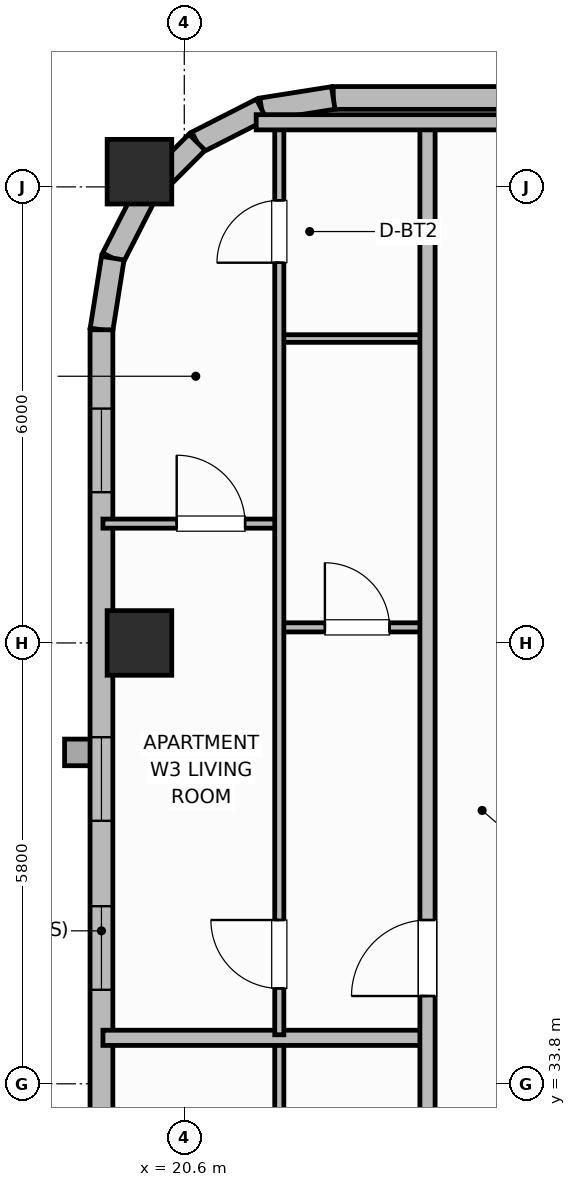
"""IFC4 building model, lengths in metres.
Left out: names, types, materials, properties, quantities, classifications, styles, units other than length and angle.
Written with IfcOpenShell. Run it as: python <this file> out.ifc"""

import sys

from ifc_helpers import new_model, si_unit, direction, frame, frame_2d, origin, origin_2d, place, context, subcontext, project, spatial, rectangle, extrude, element, fill, save


model = new_model("IFC4")
c1 = context("Model", 3, precision=1e-05, world=origin(), true_north=direction((0.0, 1.0)))
c2 = subcontext(c1, "Body", "Model", "MODEL_VIEW")
j1 = project(units=[si_unit("LENGTHUNIT", "METRE"), si_unit("PLANEANGLEUNIT", "RADIAN")], contexts=[c1])
p1 = place(None, origin())
s1 = spatial("IfcSite", under=j1, at=p1, CompositionType="ELEMENT")
p2 = place(p1, origin())
s2 = spatial("IfcBuilding", under=s1, at=p2, CompositionType="ELEMENT")
p3 = place(p2, frame((0.0, 0.0, 236.9)))
s3 = spatial("IfcBuildingStorey", under=s2, at=p3, CompositionType="ELEMENT", Elevation=236.9)
for number, where, z_axis, x_axis in (
    (1, (20.01, 39.6, 0.0), (0.0, 0.0, 1.0), (1.0, 0.0, 0.0)),
    (2, (20.01, 45.8, 0.0), (0.0, 0.0, 1.0), (1.0, 0.0, 0.0)),
):
    element("IfcColumn", number, at=place(p3, frame(where, z_axis=z_axis, x_axis=x_axis)), inside=s3, PredefinedType="COLUMN", context=c2, shape_type="SweptSolid", body=[
        extrude(rectangle(XDim=0.85, YDim=0.85, at=origin_2d()), origin(), (0.0, 0.0, 1.0), 3.7),
    ])
p4 = place(p3, frame((47.79, 46.77, 0.0), z_axis=(0.0, 0.0, 1.0), x_axis=(-1.0, 0.0, 0.0)))
e3 = element("IfcWall", 3, at=p4, inside=s3, PredefinedType="SOLIDWALL", context=c2, shape_type="SweptSolid", body=[
    extrude(rectangle(XDim=25.23, YDim=0.3, at=frame_2d((12.615, 0.0))), origin(), (0.0, 0.0, 1.0), 2.73),
])
p5 = place(p4, frame((1.659, 0.0, 0.76)))
e4 = element("IfcOpeningElement", 4, at=p5, cuts=e3, PredefinedType="OPENING", context=c2, shape_type="SweptSolid", body=[
    extrude(rectangle(XDim=1.4, YDim=1.85, at=frame_2d((0.7, 0.925))), frame((0.0, 0.16, 0.0), z_axis=(0.0, -1.0, 0.0), x_axis=(1.0, 0.0, 0.0)), (0.0, 0.0, 1.0), 0.32),
])
p6 = place(p4, frame((5.778, 0.0, 0.76)))
e5 = element("IfcOpeningElement", 5, at=p6, cuts=e3, PredefinedType="OPENING", context=c2, shape_type="SweptSolid", body=[
    extrude(rectangle(XDim=1.4, YDim=1.85, at=frame_2d((0.7, 0.925))), frame((0.0, 0.16, 0.0), z_axis=(0.0, -1.0, 0.0), x_axis=(1.0, 0.0, 0.0)), (0.0, 0.0, 1.0), 0.32),
])
p7 = place(p4, frame((8.496, 0.0, 0.76)))
e6 = element("IfcOpeningElement", 6, at=p7, cuts=e3, PredefinedType="OPENING", context=c2, shape_type="SweptSolid", body=[
    extrude(rectangle(XDim=1.4, YDim=1.85, at=frame_2d((0.7, 0.925))), frame((0.0, 0.16, 0.0), z_axis=(0.0, -1.0, 0.0), x_axis=(1.0, 0.0, 0.0)), (0.0, 0.0, 1.0), 0.32),
])
p8 = place(p4, frame((15.333, 0.0, 0.76)))
e7 = element("IfcOpeningElement", 7, at=p8, cuts=e3, PredefinedType="OPENING", context=c2, shape_type="SweptSolid", body=[
    extrude(rectangle(XDim=1.4, YDim=1.85, at=frame_2d((0.7, 0.925))), frame((0.0, 0.16, 0.0), z_axis=(0.0, -1.0, 0.0), x_axis=(1.0, 0.0, 0.0)), (0.0, 0.0, 1.0), 0.32),
])
p9 = place(p4, frame((18.752, 0.0, 0.76)))
e8 = element("IfcOpeningElement", 8, at=p9, cuts=e3, PredefinedType="OPENING", context=c2, shape_type="SweptSolid", body=[
    extrude(rectangle(XDim=1.4, YDim=1.85, at=frame_2d((0.7, 0.925))), frame((0.0, 0.16, 0.0), z_axis=(0.0, -1.0, 0.0), x_axis=(1.0, 0.0, 0.0)), (0.0, 0.0, 1.0), 0.32),
])
p10 = place(p3, frame((22.56, 46.77, 0.0), z_axis=(0.0, 0.0, 1.0), x_axis=(-0.987669453596, -0.156553666304, 0.0)))
e9 = element("IfcWall", 9, at=p10, inside=s3, PredefinedType="SOLIDWALL", context=c2, shape_type="SweptSolid", body=[
    extrude(rectangle(XDim=0.954, YDim=0.3, at=frame_2d((0.477, 0.0))), origin(), (0.0, 0.0, 1.0), 2.73),
])
p11 = place(p3, frame((21.617, 46.621, 0.0), z_axis=(0.0, 0.0, 1.0), x_axis=(-0.891023873617, -0.45395644796, 0.0)))
e10 = element("IfcWall", 10, at=p11, inside=s3, PredefinedType="SOLIDWALL", context=c2, shape_type="SweptSolid", body=[
    extrude(rectangle(XDim=0.954, YDim=0.3, at=frame_2d((0.477, 0.0))), origin(), (0.0, 0.0, 1.0), 2.73),
])
p12 = place(p3, frame((20.767, 46.188, 0.0), z_axis=(0.0, 0.0, 1.0), x_axis=(-0.707106781187, -0.707106781187, 0.0)))
e11 = element("IfcWall", 11, at=p12, inside=s3, PredefinedType="SOLIDWALL", context=c2, shape_type="SweptSolid", body=[
    extrude(rectangle(XDim=0.954, YDim=0.3, at=frame_2d((0.477, 0.0))), origin(), (0.0, 0.0, 1.0), 2.73),
])
p13 = place(p3, frame((20.093, 45.513, 0.0), z_axis=(0.0, 0.0, 1.0), x_axis=(-0.454159573051, -0.890920356825, 0.0)))
e12 = element("IfcWall", 12, at=p13, inside=s3, PredefinedType="SOLIDWALL", context=c2, shape_type="SweptSolid", body=[
    extrude(rectangle(XDim=0.954, YDim=0.3, at=frame_2d((0.477, 0.0))), origin(), (0.0, 0.0, 1.0), 2.73),
])
p14 = place(p3, frame((19.659, 44.663, 0.0), z_axis=(0.0, 0.0, 1.0), x_axis=(-0.156304114255, -0.987708977314, 0.0)))
e13 = element("IfcWall", 13, at=p14, inside=s3, PredefinedType="SOLIDWALL", context=c2, shape_type="SweptSolid", body=[
    extrude(rectangle(XDim=0.954, YDim=0.3, at=frame_2d((0.477, 0.0))), origin(), (0.0, 0.0, 1.0), 2.73),
])
p15 = place(p3, frame((19.51, 43.72, 0.0), z_axis=(0.0, 0.0, 1.0), x_axis=(0.0, -1.0, 0.0)))
e14 = element("IfcWall", 14, at=p15, inside=s3, PredefinedType="SOLIDWALL", context=c2, shape_type="SweptSolid", body=[
    extrude(rectangle(XDim=11.12, YDim=0.3, at=frame_2d((5.56, 0.0))), origin(), (0.0, 0.0, 1.0), 2.73),
])
p16 = place(p15, frame((1.037, 0.0, 0.95)))
e15 = element("IfcOpeningElement", 15, at=p16, cuts=e14, PredefinedType="OPENING", context=c2, shape_type="SweptSolid", body=[
    extrude(rectangle(XDim=1.1, YDim=1.65, at=frame_2d((0.55, 0.825))), frame((0.0, 0.16, 0.0), z_axis=(0.0, -1.0, 0.0), x_axis=(1.0, 0.0, 0.0)), (0.0, 0.0, 1.0), 0.32),
])
p17 = place(p15, frame((5.36, 0.0, 0.95)))
e16 = element("IfcOpeningElement", 16, at=p17, cuts=e14, PredefinedType="OPENING", context=c2, shape_type="SweptSolid", body=[
    extrude(rectangle(XDim=1.1, YDim=1.65, at=frame_2d((0.55, 0.825))), frame((0.0, 0.16, 0.0), z_axis=(0.0, -1.0, 0.0), x_axis=(1.0, 0.0, 0.0)), (0.0, 0.0, 1.0), 0.32),
])
p18 = place(p15, frame((7.583, 0.0, 0.95)))
e17 = element("IfcOpeningElement", 17, at=p18, cuts=e14, PredefinedType="OPENING", context=c2, shape_type="SweptSolid", body=[
    extrude(rectangle(XDim=1.1, YDim=1.65, at=frame_2d((0.55, 0.825))), frame((0.0, 0.16, 0.0), z_axis=(0.0, -1.0, 0.0), x_axis=(1.0, 0.0, 0.0)), (0.0, 0.0, 1.0), 0.32),
])
p19 = place(p3, frame((21.85, 22.74, 0.0), z_axis=(0.0, 0.0, 1.0), x_axis=(0.0, 1.0, 0.0)))
e18 = element("IfcWall", 18, at=p19, inside=s3, PredefinedType="PARTITIONING", context=c2, shape_type="SweptSolid", body=[
    extrude(rectangle(XDim=11.625, YDim=0.12, at=frame_2d((5.812, 0.0))), origin(), (0.0, 0.0, 1.0), 2.56),
])
p20 = place(p19, frame((0.61, 0.0, 0.0)))
e19 = element("IfcOpeningElement", 19, at=p20, cuts=e18, PredefinedType="OPENING", context=c2, shape_type="SweptSolid", body=[
    extrude(rectangle(XDim=0.9, YDim=2.1, at=frame_2d((0.45, 1.05))), frame((0.0, 0.07, 0.0), z_axis=(0.0, -1.0, 0.0), x_axis=(1.0, 0.0, 0.0)), (0.0, 0.0, 1.0), 0.14),
])
p21 = place(p3, frame((19.53, 34.405, 0.0), z_axis=(0.0, 0.0, 1.0), x_axis=(1.0, 0.0, 0.0)))
e20 = element("IfcWall", 20, at=p21, inside=s3, PredefinedType="PARTITIONING", context=c2, shape_type="SweptSolid", body=[
    extrude(rectangle(XDim=4.27, YDim=0.2, at=frame_2d((2.135, 0.0))), origin(), (0.0, 0.0, 1.0), 2.56),
])
p22 = place(p3, frame((21.85, 39.805, 0.0), z_axis=(0.0, 0.0, 1.0), x_axis=(1.0, 0.0, 0.0)))
e21 = element("IfcWall", 21, at=p22, inside=s3, PredefinedType="PARTITIONING", context=c2, shape_type="SweptSolid", body=[
    extrude(rectangle(XDim=1.95, YDim=0.12, at=frame_2d((0.975, 0.0))), origin(), (0.0, 0.0, 1.0), 2.56),
])
p23 = place(p22, frame((0.6, 0.0, 0.0)))
e22 = element("IfcOpeningElement", 22, at=p23, cuts=e21, PredefinedType="OPENING", context=c2, shape_type="SweptSolid", body=[
    extrude(rectangle(XDim=0.85, YDim=2.1, at=frame_2d((0.425, 1.05))), frame((0.0, 0.07, 0.0), z_axis=(0.0, -1.0, 0.0), x_axis=(1.0, 0.0, 0.0)), (0.0, 0.0, 1.0), 0.14),
])
p24 = place(p3, frame((21.85, 43.605, 0.0), z_axis=(0.0, 0.0, 1.0), x_axis=(1.0, 0.0, 0.0)))
e23 = element("IfcWall", 23, at=p24, inside=s3, PredefinedType="PARTITIONING", context=c2, shape_type="SweptSolid", body=[
    extrude(rectangle(XDim=1.95, YDim=0.1, at=frame_2d((0.975, 0.0))), origin(), (0.0, 0.0, 1.0), 2.56),
])
p25 = place(p3, frame((19.53, 41.17, 0.0), z_axis=(0.0, 0.0, 1.0), x_axis=(1.0, 0.0, 0.0)))
e24 = element("IfcWall", 24, at=p25, inside=s3, PredefinedType="PARTITIONING", context=c2, shape_type="SweptSolid", body=[
    extrude(rectangle(XDim=2.32, YDim=0.12, at=frame_2d((1.16, 0.0))), origin(), (0.0, 0.0, 1.0), 2.56),
])
p26 = place(p25, frame((0.97, 0.0, 0.0)))
e25 = element("IfcOpeningElement", 25, at=p26, cuts=e24, PredefinedType="OPENING", context=c2, shape_type="SweptSolid", body=[
    extrude(rectangle(XDim=0.9, YDim=2.1, at=frame_2d((0.45, 1.05))), frame((0.0, 0.07, 0.0), z_axis=(0.0, -1.0, 0.0), x_axis=(1.0, 0.0, 0.0)), (0.0, 0.0, 1.0), 0.14),
])
p27 = place(p3, frame((21.85, 34.445, 0.0), z_axis=(0.0, 0.0, 1.0), x_axis=(0.0, 1.0, 0.0)))
e26 = element("IfcWall", 26, at=p27, inside=s3, PredefinedType="PARTITIONING", context=c2, shape_type="SweptSolid", body=[
    extrude(rectangle(XDim=11.965, YDim=0.12, at=frame_2d((5.982, 0.0))), origin(), (0.0, 0.0, 1.0), 2.56),
])
p28 = place(p27, frame((0.61, 0.0, 0.0)))
e27 = element("IfcOpeningElement", 27, at=p28, cuts=e26, PredefinedType="OPENING", context=c2, shape_type="SweptSolid", body=[
    extrude(rectangle(XDim=0.9, YDim=2.1, at=frame_2d((0.45, 1.05))), frame((0.0, 0.07, 0.0), z_axis=(0.0, -1.0, 0.0), x_axis=(1.0, 0.0, 0.0)), (0.0, 0.0, 1.0), 0.14),
])
p29 = place(p27, frame((10.157, 0.0, 0.0)))
e28 = element("IfcOpeningElement", 28, at=p29, cuts=e26, PredefinedType="OPENING", context=c2, shape_type="SweptSolid", body=[
    extrude(rectangle(XDim=0.82, YDim=2.08, at=frame_2d((0.41, 1.04))), frame((0.0, 0.07, 0.0), z_axis=(0.0, -1.0, 0.0), x_axis=(1.0, 0.0, 0.0)), (0.0, 0.0, 1.0), 0.14),
])
p30 = place(p3, frame((23.8, 9.95, 0.0), z_axis=(0.0, 0.0, 1.0), x_axis=(0.0, 1.0, 0.0)))
e29 = element("IfcWall", 29, at=p30, inside=s3, PredefinedType="PARTITIONING", context=c2, shape_type="SweptSolid", body=[
    extrude(rectangle(XDim=36.5, YDim=0.2, at=frame_2d((18.25, 0.0))), origin(), (0.0, 0.0, 1.0), 2.56),
])
p31 = place(p30, frame((3.25, 0.0, 0.0)))
e30 = element("IfcOpeningElement", 30, at=p31, cuts=e29, PredefinedType="OPENING", context=c2, shape_type="SweptSolid", body=[
    extrude(rectangle(XDim=1.0, YDim=2.15, at=frame_2d((0.5, 1.075))), frame((0.0, 0.11, 0.0), z_axis=(0.0, -1.0, 0.0), x_axis=(1.0, 0.0, 0.0)), (0.0, 0.0, 1.0), 0.22),
])
p32 = place(p30, frame((13.3, 0.0, 0.0)))
e31 = element("IfcOpeningElement", 31, at=p32, cuts=e29, PredefinedType="OPENING", context=c2, shape_type="SweptSolid", body=[
    extrude(rectangle(XDim=1.0, YDim=2.15, at=frame_2d((0.5, 1.075))), frame((0.0, 0.11, 0.0), z_axis=(0.0, -1.0, 0.0), x_axis=(1.0, 0.0, 0.0)), (0.0, 0.0, 1.0), 0.22),
])
p33 = place(p30, frame((25.005, 0.0, 0.0)))
e32 = element("IfcOpeningElement", 32, at=p33, cuts=e29, PredefinedType="OPENING", context=c2, shape_type="SweptSolid", body=[
    extrude(rectangle(XDim=1.0, YDim=2.15, at=frame_2d((0.5, 1.075))), frame((0.0, 0.11, 0.0), z_axis=(0.0, -1.0, 0.0), x_axis=(1.0, 0.0, 0.0)), (0.0, 0.0, 1.0), 0.22),
])
p34 = place(p3, frame((21.546, 46.45, 0.0), z_axis=(0.0, 0.0, 1.0), x_axis=(1.0, 0.0, 0.0)))
e33 = element("IfcWall", 33, at=p34, inside=s3, PredefinedType="PARTITIONING", context=c2, shape_type="SweptSolid", body=[
    extrude(rectangle(XDim=3.754, YDim=0.2, at=frame_2d((1.877, 0.0))), origin(), (0.0, 0.0, 1.0), 2.56),
])
p35 = place(p16, origin())
e34 = element("IfcWindow", 34, at=p35, inside=s3, PartitioningType="SINGLE_PANEL", PredefinedType="WINDOW", context=c2, shape_type="SweptSolid", body=[
    extrude(rectangle(XDim=1.1, YDim=1.65, at=frame_2d((0.55, 0.825))), frame((0.0, 0.03, 0.0), z_axis=(0.0, -1.0, 0.0), x_axis=(1.0, 0.0, 0.0)), (0.0, 0.0, 1.0), 0.06),
])
fill(e15, e34)
p36 = place(p17, origin())
e35 = element("IfcWindow", 35, at=p36, inside=s3, PartitioningType="SINGLE_PANEL", PredefinedType="WINDOW", context=c2, shape_type="SweptSolid", body=[
    extrude(rectangle(XDim=1.1, YDim=1.65, at=frame_2d((0.55, 0.825))), frame((0.0, 0.03, 0.0), z_axis=(0.0, -1.0, 0.0), x_axis=(1.0, 0.0, 0.0)), (0.0, 0.0, 1.0), 0.06),
])
fill(e16, e35)
p37 = place(p18, origin())
e36 = element("IfcWindow", 36, at=p37, inside=s3, PartitioningType="SINGLE_PANEL", PredefinedType="WINDOW", context=c2, shape_type="SweptSolid", body=[
    extrude(rectangle(XDim=1.1, YDim=1.65, at=frame_2d((0.55, 0.825))), frame((0.0, 0.03, 0.0), z_axis=(0.0, -1.0, 0.0), x_axis=(1.0, 0.0, 0.0)), (0.0, 0.0, 1.0), 0.06),
])
fill(e17, e36)
p38 = place(p23, origin())
e37 = element("IfcDoor", 37, at=p38, inside=s3, OperationType="SINGLE_SWING_LEFT", PredefinedType="DOOR", context=c2, shape_type="SweptSolid", body=[
    extrude(rectangle(XDim=0.85, YDim=2.1, at=frame_2d((0.425, 1.05))), frame((0.0, 0.025, 0.0), z_axis=(0.0, -1.0, 0.0), x_axis=(1.0, 0.0, 0.0)), (0.0, 0.0, 1.0), 0.05),
])
fill(e22, e37)
p39 = place(p26, origin())
e38 = element("IfcDoor", 38, at=p39, inside=s3, OperationType="SINGLE_SWING_LEFT", PredefinedType="DOOR", context=c2, shape_type="SweptSolid", body=[
    extrude(rectangle(XDim=0.9, YDim=2.1, at=frame_2d((0.45, 1.05))), frame((0.0, 0.025, 0.0), z_axis=(0.0, -1.0, 0.0), x_axis=(1.0, 0.0, 0.0)), (0.0, 0.0, 1.0), 0.05),
])
fill(e25, e38)
p40 = place(p28, origin())
e39 = element("IfcDoor", 39, at=p40, inside=s3, OperationType="SINGLE_SWING_RIGHT", PredefinedType="DOOR", context=c2, shape_type="SweptSolid", body=[
    extrude(rectangle(XDim=0.9, YDim=2.1, at=frame_2d((0.45, 1.05))), frame((0.0, 0.025, 0.0), z_axis=(0.0, -1.0, 0.0), x_axis=(1.0, 0.0, 0.0)), (0.0, 0.0, 1.0), 0.05),
])
fill(e27, e39)
p41 = place(p29, origin())
e40 = element("IfcDoor", 40, at=p41, inside=s3, OperationType="SINGLE_SWING_LEFT", PredefinedType="DOOR", context=c2, shape_type="SweptSolid", body=[
    extrude(rectangle(XDim=0.82, YDim=2.08, at=frame_2d((0.41, 1.04))), frame((0.0, 0.025, 0.0), z_axis=(0.0, -1.0, 0.0), x_axis=(1.0, 0.0, 0.0)), (0.0, 0.0, 1.0), 0.05),
])
fill(e28, e40)
p42 = place(p33, origin())
e41 = element("IfcDoor", 41, at=p42, inside=s3, OperationType="SINGLE_SWING_LEFT", PredefinedType="DOOR", context=c2, shape_type="SweptSolid", body=[
    extrude(rectangle(XDim=1.0, YDim=2.15, at=frame_2d((0.5, 1.075))), frame((0.0, 0.025, 0.0), z_axis=(0.0, -1.0, 0.0), x_axis=(1.0, 0.0, 0.0)), (0.0, 0.0, 1.0), 0.05),
])
fill(e32, e41)
save(model, sys.argv[1])
